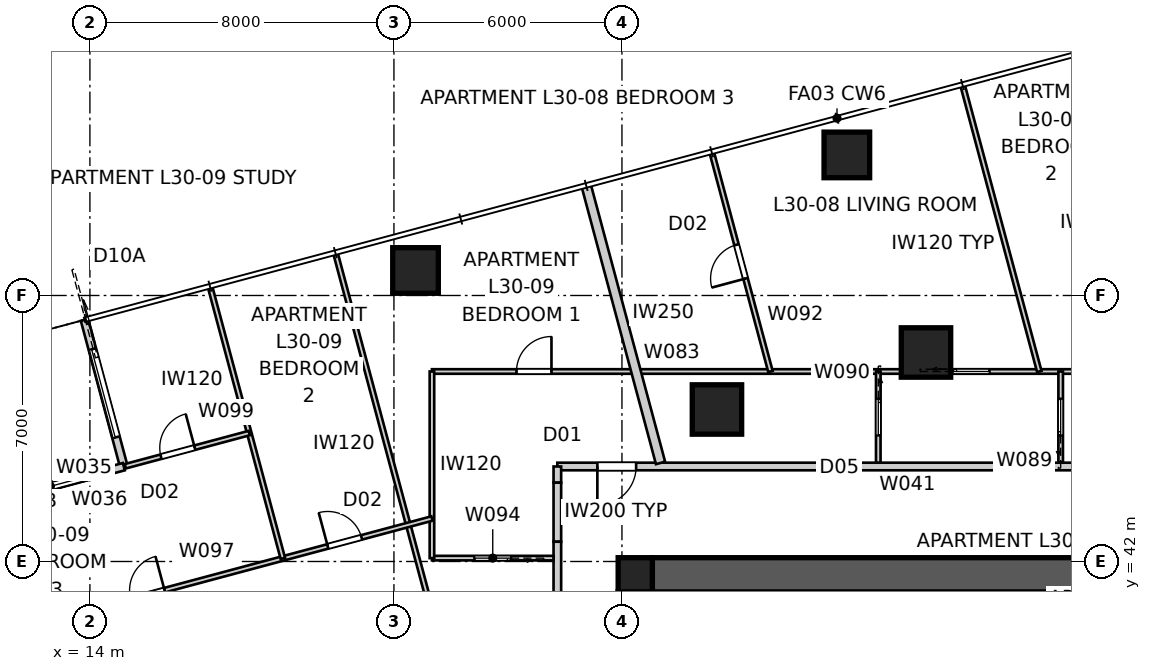
"""IFC4 building model, lengths in metres.
Left out: names, types, materials, properties, quantities, classifications, styles, units other than length and angle.
Written with IfcOpenShell. Run it as: python <this file> out.ifc"""

import sys

from ifc_helpers import new_model, si_unit, direction, frame, frame_2d, origin, origin_2d, place, context, subcontext, project, spatial, polyline, rectangle, outline, extrude, element, fill, save


model = new_model("IFC4")
c1 = context("Model", 3, precision=1e-05, world=origin(), true_north=direction((0.0, 1.0)))
c2 = subcontext(c1, "Body", "Model", "MODEL_VIEW")
j1 = project(units=[si_unit("LENGTHUNIT", "METRE"), si_unit("PLANEANGLEUNIT", "RADIAN")], contexts=[c1])
p1 = place(None, origin())
s1 = spatial("IfcSite", under=j1, at=p1, CompositionType="ELEMENT")
p2 = place(p1, origin())
s2 = spatial("IfcBuilding", under=s1, at=p2, CompositionType="ELEMENT")
p3 = place(p2, frame((0.0, 0.0, 111.6)))
s3 = spatial("IfcBuildingStorey", under=s2, at=p3, CompositionType="ELEMENT", Elevation=111.6)
p4 = place(p3, frame((28.8, 41.65, 0.0), z_axis=(0.0, 0.0, 1.0), x_axis=(1.0, 0.0, 0.0)))
e1 = element("IfcWall", 1, at=p4, inside=s3, PredefinedType="SHEAR", context=c2, shape_type="SweptSolid", body=[
    extrude(outline(polyline([(0.0, -0.45), (22.4, -0.45), (22.4, -0.025), (22.85, -0.025), (22.85, 0.025), (22.4, 0.025), (22.4, 0.45), (0.0, 0.45), (0.0, 0.025), (-0.45, 0.025), (-0.45, -0.025), (0.0, -0.025), (0.0, -0.45)])), origin(), (0.0, 0.0, 1.0), 3.4),
])
p5 = place(p3, frame((28.35, 41.2, 0.0), z_axis=(0.0, 0.0, 1.0), x_axis=(0.0, -1.0, 0.0)))
e2 = element("IfcWall", 2, at=p5, inside=s3, PredefinedType="SHEAR", context=c2, shape_type="SweptSolid", body=[
    extrude(outline(polyline([(0.0, -0.45), (22.4, -0.45), (22.4, -0.025), (22.85, -0.025), (22.85, 0.025), (22.4, 0.025), (22.4, 0.45), (0.0, 0.45), (0.0, 0.025), (-0.45, 0.025), (-0.45, -0.025), (0.0, -0.025), (0.0, -0.45)])), origin(), (0.0, 0.0, 1.0), 3.4),
])
p6 = place(p5, frame((11.14, 0.0, 0.0)))
e3 = element("IfcOpeningElement", 3, at=p6, cuts=e2, PredefinedType="OPENING", context=c2, shape_type="SweptSolid", body=[
    extrude(rectangle(XDim=1.02, YDim=2.4, at=frame_2d((0.51, 1.2))), frame((0.0, 0.46, 0.0), z_axis=(0.0, -1.0, 0.0), x_axis=(1.0, 0.0, 0.0)), (0.0, 0.0, 1.0), 0.92),
])
p7 = place(p3, frame((28.35, 41.65, 0.0), z_axis=(0.0, 0.0, 1.0), x_axis=(1.0, 0.0, 0.0)))
e4 = element("IfcColumn", 4, at=p7, inside=s3, PredefinedType="COLUMN", context=c2, shape_type="SweptSolid", body=[
    extrude(rectangle(XDim=0.9, YDim=0.9, at=origin_2d()), origin(), (0.0, 0.0, 1.0), 3.4),
])
for number, where, z_axis, x_axis in (
    (5, (33.918, 52.699, -0.15), (0.0, 0.0, 1.0), (1.0, 0.0, 0.0)),
    (6, (22.568, 49.658, -0.15), (0.0, 0.0, 1.0), (1.0, 0.0, 0.0)),
):
    element("IfcColumn", number, at=place(p3, frame(where, z_axis=z_axis, x_axis=x_axis)), inside=s3, PredefinedType="COLUMN", context=c2, shape_type="SweptSolid", body=[
        extrude(rectangle(XDim=1.2, YDim=1.2, at=origin_2d()), origin(), (0.0, 0.0, 1.0), 3.55),
    ])
for number, where, z_axis, x_axis in (
    (7, (36.0, 47.5, 0.0), (0.0, 0.0, 1.0), (1.0, 0.0, 0.0)),
    (8, (30.5, 46.0, 0.0), (0.0, 0.0, 1.0), (1.0, 0.0, 0.0)),
):
    element("IfcColumn", number, at=place(p3, frame(where, z_axis=z_axis, x_axis=x_axis)), inside=s3, PredefinedType="COLUMN", context=c2, shape_type="SweptSolid", body=[
        extrude(rectangle(XDim=1.3, YDim=1.3, at=origin_2d()), origin(), (0.0, 0.0, 1.0), 3.4),
    ])
p8 = place(p3, frame((13.857, 48.359, 0.0), z_axis=(0.0, 0.0, 1.0), x_axis=(0.258843877716, -0.965919172068, 0.0)))
e9 = element("IfcWall", 9, at=p8, inside=s3, PredefinedType="SOLIDWALL", context=c2, shape_type="SweptSolid", body=[
    extrude(rectangle(XDim=4.0, YDim=0.2, at=frame_2d((2.0, 0.0))), origin(), (0.0, 0.0, 1.0), 3.25),
])
p9 = place(p8, frame((0.8, 0.0, 0.0)))
e10 = element("IfcOpeningElement", 10, at=p9, cuts=e9, PredefinedType="OPENING", context=c2, shape_type="SweptSolid", body=[
    extrude(rectangle(XDim=2.4, YDim=2.1, at=frame_2d((1.2, 1.05))), frame((0.0, 0.11, 0.0), z_axis=(0.0, -1.0, 0.0), x_axis=(1.0, 0.0, 0.0)), (0.0, 0.0, 1.0), 0.22),
])
p10 = place(p3, frame((14.893, 44.496, 0.0), z_axis=(0.0, 0.0, 1.0), x_axis=(-0.965934430412, -0.258786931944, 0.0)))
e11 = element("IfcWall", 11, at=p10, inside=s3, PredefinedType="SOLIDWALL", context=c2, shape_type="SweptSolid", body=[
    extrude(rectangle(XDim=4.0, YDim=0.2, at=frame_2d((2.0, 0.0))), origin(), (0.0, 0.0, 1.0), 3.25),
])
p11 = place(p10, frame((1.0, 0.0, 0.45)))
e12 = element("IfcOpeningElement", 12, at=p11, cuts=e11, PredefinedType="OPENING", context=c2, shape_type="SweptSolid", body=[
    extrude(rectangle(XDim=2.0, YDim=1.8, at=frame_2d((1.0, 0.9))), frame((0.0, 0.11, 0.0), z_axis=(0.0, -1.0, 0.0), x_axis=(1.0, 0.0, 0.0)), (0.0, 0.0, 1.0), 0.22),
])
p12 = place(p3, frame((54.5, 44.5, 0.0), z_axis=(0.0, 0.0, 1.0), x_axis=(-1.0, 0.0, 0.0)))
e13 = element("IfcWall", 13, at=p12, inside=s3, PredefinedType="PARTITIONING", context=c2, shape_type="SweptSolid", body=[
    extrude(rectangle(XDim=28.2, YDim=0.2, at=frame_2d((14.1, 0.0))), origin(), (0.0, 0.0, 1.0), 3.25),
])
p13 = place(p12, frame((10.837, 0.0, 0.0)))
e14 = element("IfcOpeningElement", 14, at=p13, cuts=e13, PredefinedType="OPENING", context=c2, shape_type="SweptSolid", body=[
    extrude(rectangle(XDim=1.02, YDim=2.34, at=frame_2d((0.51, 1.17))), frame((0.0, 0.11, 0.0), z_axis=(0.0, -1.0, 0.0), x_axis=(1.0, 0.0, 0.0)), (0.0, 0.0, 1.0), 0.22),
])
p14 = place(p12, frame((5.7, 0.0, 0.0)))
e15 = element("IfcOpeningElement", 15, at=p14, cuts=e13, PredefinedType="OPENING", context=c2, shape_type="SweptSolid", body=[
    extrude(rectangle(XDim=1.02, YDim=2.34, at=frame_2d((0.51, 1.17))), frame((0.0, 0.11, 0.0), z_axis=(0.0, -1.0, 0.0), x_axis=(1.0, 0.0, 0.0)), (0.0, 0.0, 1.0), 0.22),
])
p15 = place(p12, frame((26.127, 0.0, 0.0)))
e16 = element("IfcOpeningElement", 16, at=p15, cuts=e13, PredefinedType="OPENING", context=c2, shape_type="SweptSolid", body=[
    extrude(rectangle(XDim=1.02, YDim=2.34, at=frame_2d((0.51, 1.17))), frame((0.0, 0.11, 0.0), z_axis=(0.0, -1.0, 0.0), x_axis=(1.0, 0.0, 0.0)), (0.0, 0.0, 1.0), 0.22),
])
p16 = place(p3, frame((26.3, 44.5, 0.0), z_axis=(0.0, 0.0, 1.0), x_axis=(0.0, -1.0, 0.0)))
e17 = element("IfcWall", 17, at=p16, inside=s3, PredefinedType="PARTITIONING", context=c2, shape_type="SweptSolid", body=[
    extrude(rectangle(XDim=0.426, YDim=0.2, at=frame_2d((0.213, 0.0))), origin(), (0.0, 0.0, 1.0), 3.25),
])
p17 = place(p3, frame((26.3, 44.074, 0.0), z_axis=(0.0, 0.0, 1.0), x_axis=(0.0, -1.0, 0.0)))
e18 = element("IfcWall", 18, at=p17, inside=s3, PredefinedType="PARTITIONING", context=c2, shape_type="SweptSolid", body=[
    extrude(rectangle(XDim=1.554, YDim=0.2, at=frame_2d((0.777, 0.0))), origin(), (0.0, 0.0, 1.0), 2.722),
])
p18 = place(p3, frame((26.3, 42.52, 0.0), z_axis=(0.0, 0.0, 1.0), x_axis=(0.0, -1.0, 0.0)))
e19 = element("IfcWall", 19, at=p18, inside=s3, PredefinedType="PARTITIONING", context=c2, shape_type="SweptSolid", body=[
    extrude(rectangle(XDim=27.02, YDim=0.2, at=frame_2d((13.51, 0.0))), origin(), (0.0, 0.0, 1.0), 3.25),
])
p19 = place(p18, frame((23.584, 0.0, 0.0)))
e20 = element("IfcOpeningElement", 20, at=p19, cuts=e19, PredefinedType="OPENING", context=c2, shape_type="SweptSolid", body=[
    extrude(rectangle(XDim=1.02, YDim=2.1, at=frame_2d((0.51, 1.05))), frame((0.0, 0.11, 0.0), z_axis=(0.0, -1.0, 0.0), x_axis=(1.0, 0.0, 0.0)), (0.0, 0.0, 1.0), 0.22),
])
p20 = place(p18, frame((13.468, 0.0, 0.0)))
e21 = element("IfcOpeningElement", 21, at=p20, cuts=e19, PredefinedType="OPENING", context=c2, shape_type="SweptSolid", body=[
    extrude(rectangle(XDim=1.02, YDim=2.34, at=frame_2d((0.51, 1.17))), frame((0.0, 0.11, 0.0), z_axis=(0.0, -1.0, 0.0), x_axis=(1.0, 0.0, 0.0)), (0.0, 0.0, 1.0), 0.22),
])
p21 = place(p3, frame((27.058, 51.896, 0.0), z_axis=(0.0, 0.0, 1.0), x_axis=(0.258822171171, -0.965924988656, 0.0)))
e22 = element("IfcWall", 22, at=p21, inside=s3, PredefinedType="PARTITIONING", context=c2, shape_type="SweptSolid", body=[
    extrude(rectangle(XDim=7.56, YDim=0.25, at=frame_2d((3.78, 0.0))), origin(), (0.0, 0.0, 1.0), 3.25),
])
p22 = place(p3, frame((23.0, 47.0, 0.0), z_axis=(0.0, 0.0, 1.0), x_axis=(1.0, 0.0, 0.0)))
e23 = element("IfcWall", 23, at=p22, inside=s3, PredefinedType="PARTITIONING", context=c2, shape_type="SweptSolid", body=[
    extrude(rectangle(XDim=25.241, YDim=0.12, at=frame_2d((12.62, 0.0))), origin(), (0.0, 0.0, 1.0), 2.55),
])
p23 = place(p22, frame((21.702, 0.0, 0.0)))
e24 = element("IfcOpeningElement", 24, at=p23, cuts=e23, PredefinedType="OPENING", context=c2, shape_type="SweptSolid", body=[
    extrude(rectangle(XDim=0.92, YDim=2.34, at=frame_2d((0.46, 1.17))), frame((0.0, 0.07, 0.0), z_axis=(0.0, -1.0, 0.0), x_axis=(1.0, 0.0, 0.0)), (0.0, 0.0, 1.0), 0.14),
])
p24 = place(p22, frame((17.598, 0.0, 0.0)))
e25 = element("IfcOpeningElement", 25, at=p24, cuts=e23, PredefinedType="OPENING", context=c2, shape_type="SweptSolid", body=[
    extrude(rectangle(XDim=0.92, YDim=2.34, at=frame_2d((0.46, 1.17))), frame((0.0, 0.07, 0.0), z_axis=(0.0, -1.0, 0.0), x_axis=(1.0, 0.0, 0.0)), (0.0, 0.0, 1.0), 0.14),
])
p25 = place(p22, frame((23.689, 0.0, 0.0)))
e26 = element("IfcOpeningElement", 26, at=p25, cuts=e23, PredefinedType="OPENING", context=c2, shape_type="SweptSolid", body=[
    extrude(rectangle(XDim=0.92, YDim=2.34, at=frame_2d((0.46, 1.17))), frame((0.0, 0.07, 0.0), z_axis=(0.0, -1.0, 0.0), x_axis=(1.0, 0.0, 0.0)), (0.0, 0.0, 1.0), 0.14),
])
p26 = place(p22, frame((2.225, 0.0, 0.0)))
e27 = element("IfcOpeningElement", 27, at=p26, cuts=e23, PredefinedType="OPENING", context=c2, shape_type="SweptSolid", body=[
    extrude(rectangle(XDim=0.92, YDim=2.34, at=frame_2d((0.46, 1.17))), frame((0.0, 0.07, 0.0), z_axis=(0.0, -1.0, 0.0), x_axis=(1.0, 0.0, 0.0)), (0.0, 0.0, 1.0), 0.14),
])
p27 = place(p22, frame((13.709, 0.0, 0.0)))
e28 = element("IfcOpeningElement", 28, at=p27, cuts=e23, PredefinedType="OPENING", context=c2, shape_type="SweptSolid", body=[
    extrude(rectangle(XDim=0.96, YDim=2.1, at=frame_2d((0.48, 1.05))), frame((0.0, 0.07, 0.0), z_axis=(0.0, -1.0, 0.0), x_axis=(1.0, 0.0, 0.0)), (0.0, 0.0, 1.0), 0.14),
])
p28 = place(p3, frame((39.544, 44.6, 0.0), z_axis=(0.0, 0.0, 1.0), x_axis=(0.0, 1.0, 0.0)))
e29 = element("IfcWall", 29, at=p28, inside=s3, PredefinedType="PARTITIONING", context=c2, shape_type="SweptSolid", body=[
    extrude(rectangle(XDim=2.4, YDim=0.12, at=frame_2d((1.2, 0.0))), origin(), (0.0, 0.0, 1.0), 3.25),
])
p29 = place(p28, frame((0.72, 0.0, 0.0)))
e30 = element("IfcOpeningElement", 30, at=p29, cuts=e29, PredefinedType="OPENING", context=c2, shape_type="SweptSolid", body=[
    extrude(rectangle(XDim=0.96, YDim=2.1, at=frame_2d((0.48, 1.05))), frame((0.0, 0.07, 0.0), z_axis=(0.0, -1.0, 0.0), x_axis=(1.0, 0.0, 0.0)), (0.0, 0.0, 1.0), 0.14),
])
p30 = place(p3, frame((34.745, 47.0, 0.0), z_axis=(0.0, 0.0, 1.0), x_axis=(0.0, -1.0, 0.0)))
e31 = element("IfcWall", 31, at=p30, inside=s3, PredefinedType="PARTITIONING", context=c2, shape_type="SweptSolid", body=[
    extrude(rectangle(XDim=2.4, YDim=0.12, at=frame_2d((1.2, 0.0))), origin(), (0.0, 0.0, 1.0), 3.25),
])
p31 = place(p30, frame((0.72, 0.0, 0.0)))
e32 = element("IfcOpeningElement", 32, at=p31, cuts=e31, PredefinedType="OPENING", context=c2, shape_type="SweptSolid", body=[
    extrude(rectangle(XDim=0.96, YDim=2.1, at=frame_2d((0.48, 1.05))), frame((0.0, 0.07, 0.0), z_axis=(0.0, -1.0, 0.0), x_axis=(1.0, 0.0, 0.0)), (0.0, 0.0, 1.0), 0.14),
])
p32 = place(p3, frame((36.969, 54.511, 0.0), z_axis=(0.0, 0.0, 1.0), x_axis=(0.258813509689, -0.965927309482, 0.0)))
e33 = element("IfcWall", 33, at=p32, inside=s3, PredefinedType="PARTITIONING", context=c2, shape_type="SweptSolid", body=[
    extrude(rectangle(XDim=7.776, YDim=0.12, at=frame_2d((3.888, 0.0))), origin(), (0.0, 0.0, 1.0), 3.25),
])
p33 = place(p3, frame((31.908, 47.0, 0.0), z_axis=(0.0, 0.0, 1.0), x_axis=(-0.258812722515, 0.965927520399, 0.0)))
e34 = element("IfcWall", 34, at=p33, inside=s3, PredefinedType="PARTITIONING", context=c2, shape_type="SweptSolid", body=[
    extrude(rectangle(XDim=5.945, YDim=0.12, at=frame_2d((2.972, 0.0))), origin(), (0.0, 0.0, 1.0), 3.25),
])
p34 = place(p33, frame((2.532, 0.0, 0.0)))
e35 = element("IfcOpeningElement", 35, at=p34, cuts=e34, PredefinedType="OPENING", context=c2, shape_type="SweptSolid", body=[
    extrude(rectangle(XDim=0.92, YDim=2.34, at=frame_2d((0.46, 1.17))), frame((0.0, 0.07, 0.0), z_axis=(0.0, -1.0, 0.0), x_axis=(1.0, 0.0, 0.0)), (0.0, 0.0, 1.0), 0.14),
])
p35 = place(p3, frame((26.2, 42.089, 0.0), z_axis=(0.0, 0.0, 1.0), x_axis=(-1.0, 0.0, 0.0)))
e36 = element("IfcWall", 36, at=p35, inside=s3, PredefinedType="PARTITIONING", context=c2, shape_type="SweptSolid", body=[
    extrude(rectangle(XDim=3.2, YDim=0.12, at=frame_2d((1.6, 0.0))), origin(), (0.0, 0.0, 1.0), 3.25),
])
p36 = place(p35, frame((1.12, 0.0, 0.0)))
e37 = element("IfcOpeningElement", 37, at=p36, cuts=e36, PredefinedType="OPENING", context=c2, shape_type="SweptSolid", body=[
    extrude(rectangle(XDim=0.96, YDim=2.1, at=frame_2d((0.48, 1.05))), frame((0.0, 0.07, 0.0), z_axis=(0.0, -1.0, 0.0), x_axis=(1.0, 0.0, 0.0)), (0.0, 0.0, 1.0), 0.14),
])
p37 = place(p3, frame((23.0, 42.089, 0.0), z_axis=(0.0, 0.0, 1.0), x_axis=(0.0, 1.0, 0.0)))
e38 = element("IfcWall", 38, at=p37, inside=s3, PredefinedType="PARTITIONING", context=c2, shape_type="SweptSolid", body=[
    extrude(rectangle(XDim=4.911, YDim=0.12, at=frame_2d((2.456, 0.0))), origin(), (0.0, 0.0, 1.0), 3.25),
])
p38 = place(p3, frame((23.0, 40.64, 0.0), z_axis=(0.0, 0.0, 1.0), x_axis=(-0.258790139317, 0.965933571108, 0.0)))
e39 = element("IfcWall", 39, at=p38, inside=s3, PredefinedType="PARTITIONING", context=c2, shape_type="SweptSolid", body=[
    extrude(rectangle(XDim=9.783, YDim=0.12, at=frame_2d((4.892, 0.0))), origin(), (0.0, 0.0, 1.0), 2.638),
])
p39 = place(p3, frame((11.952, 40.17, 0.0), z_axis=(0.0, 0.0, 1.0), x_axis=(0.965923183761, 0.258828906952, 0.0)))
e40 = element("IfcWall", 40, at=p39, inside=s3, PredefinedType="PARTITIONING", context=c2, shape_type="SweptSolid", body=[
    extrude(rectangle(XDim=11.438, YDim=0.12, at=frame_2d((5.719, 0.0))), origin(), (0.0, 0.0, 1.0), 3.25),
])
p40 = place(p39, frame((3.233, 0.0, 0.0)))
e41 = element("IfcOpeningElement", 41, at=p40, cuts=e40, PredefinedType="OPENING", context=c2, shape_type="SweptSolid", body=[
    extrude(rectangle(XDim=0.92, YDim=2.34, at=frame_2d((0.46, 1.17))), frame((0.0, 0.07, 0.0), z_axis=(0.0, -1.0, 0.0), x_axis=(1.0, 0.0, 0.0)), (0.0, 0.0, 1.0), 0.14),
])
p41 = place(p39, frame((8.6, 0.0, 0.0)))
e42 = element("IfcOpeningElement", 42, at=p41, cuts=e40, PredefinedType="OPENING", context=c2, shape_type="SweptSolid", body=[
    extrude(rectangle(XDim=0.92, YDim=2.34, at=frame_2d((0.46, 1.17))), frame((0.0, 0.07, 0.0), z_axis=(0.0, -1.0, 0.0), x_axis=(1.0, 0.0, 0.0)), (0.0, 0.0, 1.0), 0.14),
])
p42 = place(p3, frame((19.077, 42.08, 0.0), z_axis=(0.0, 0.0, 1.0), x_axis=(-0.258846923464, 0.965918355874, 0.0)))
e43 = element("IfcWall", 43, at=p42, inside=s3, PredefinedType="PARTITIONING", context=c2, shape_type="SweptSolid", body=[
    extrude(rectangle(XDim=7.377, YDim=0.12, at=frame_2d((3.688, 0.0))), origin(), (0.0, 0.0, 1.0), 3.25),
])
p43 = place(p3, frame((14.931, 44.506, 0.0), z_axis=(0.0, 0.0, 1.0), x_axis=(0.96593546512, 0.258783069815, 0.0)))
e44 = element("IfcWall", 44, at=p43, inside=s3, PredefinedType="PARTITIONING", context=c2, shape_type="SweptSolid", body=[
    extrude(rectangle(XDim=3.376, YDim=0.12, at=frame_2d((1.688, 0.0))), origin(), (0.0, 0.0, 1.0), 3.25),
])
p44 = place(p43, frame((0.971, 0.0, 0.0)))
e45 = element("IfcOpeningElement", 45, at=p44, cuts=e44, PredefinedType="OPENING", context=c2, shape_type="SweptSolid", body=[
    extrude(rectangle(XDim=0.92, YDim=2.34, at=frame_2d((0.46, 1.17))), frame((0.0, 0.07, 0.0), z_axis=(0.0, -1.0, 0.0), x_axis=(1.0, 0.0, 0.0)), (0.0, 0.0, 1.0), 0.14),
])
p45 = place(p9, origin())
e46 = element("IfcDoor", 46, at=p45, inside=s3, OperationType="SLIDING_TO_LEFT", PredefinedType="DOOR", context=c2, shape_type="SweptSolid", body=[
    extrude(rectangle(XDim=2.4, YDim=2.1, at=frame_2d((1.2, 1.05))), frame((0.0, 0.025, 0.0), z_axis=(0.0, -1.0, 0.0), x_axis=(1.0, 0.0, 0.0)), (0.0, 0.0, 1.0), 0.05),
])
fill(e10, e46)
p46 = place(p11, origin())
e47 = element("IfcWindow", 47, at=p46, inside=s3, PartitioningType="SINGLE_PANEL", PredefinedType="WINDOW", context=c2, shape_type="SweptSolid", body=[
    extrude(rectangle(XDim=2.0, YDim=1.8, at=frame_2d((1.0, 0.9))), frame((0.0, 0.03, 0.0), z_axis=(0.0, -1.0, 0.0), x_axis=(1.0, 0.0, 0.0)), (0.0, 0.0, 1.0), 0.06),
])
fill(e12, e47)
p47 = place(p15, origin())
e48 = element("IfcDoor", 48, at=p47, inside=s3, OperationType="SINGLE_SWING_RIGHT", PredefinedType="DOOR", context=c2, shape_type="SweptSolid", body=[
    extrude(rectangle(XDim=1.02, YDim=2.34, at=frame_2d((0.51, 1.17))), frame((0.0, 0.025, 0.0), z_axis=(0.0, -1.0, 0.0), x_axis=(1.0, 0.0, 0.0)), (0.0, 0.0, 1.0), 0.05),
])
fill(e16, e48)
p48 = place(p29, origin())
e49 = element("IfcDoor", 49, at=p48, inside=s3, OperationType="SLIDING_TO_LEFT", PredefinedType="DOOR", context=c2, shape_type="SweptSolid", body=[
    extrude(rectangle(XDim=0.96, YDim=2.1, at=frame_2d((0.48, 1.05))), frame((0.0, 0.025, 0.0), z_axis=(0.0, -1.0, 0.0), x_axis=(1.0, 0.0, 0.0)), (0.0, 0.0, 1.0), 0.05),
])
fill(e30, e49)
p49 = place(p26, origin())
e50 = element("IfcDoor", 50, at=p49, inside=s3, OperationType="SINGLE_SWING_RIGHT", PredefinedType="DOOR", context=c2, shape_type="SweptSolid", body=[
    extrude(rectangle(XDim=0.92, YDim=2.34, at=frame_2d((0.46, 1.17))), frame((0.0, 0.025, 0.0), z_axis=(0.0, -1.0, 0.0), x_axis=(1.0, 0.0, 0.0)), (0.0, 0.0, 1.0), 0.05),
])
fill(e27, e50)
p50 = place(p36, origin())
e51 = element("IfcDoor", 51, at=p50, inside=s3, OperationType="SLIDING_TO_LEFT", PredefinedType="DOOR", context=c2, shape_type="SweptSolid", body=[
    extrude(rectangle(XDim=0.96, YDim=2.1, at=frame_2d((0.48, 1.05))), frame((0.0, 0.025, 0.0), z_axis=(0.0, -1.0, 0.0), x_axis=(1.0, 0.0, 0.0)), (0.0, 0.0, 1.0), 0.05),
])
fill(e37, e51)
p51 = place(p27, origin())
e52 = element("IfcDoor", 52, at=p51, inside=s3, OperationType="SLIDING_TO_LEFT", PredefinedType="DOOR", context=c2, shape_type="SweptSolid", body=[
    extrude(rectangle(XDim=0.96, YDim=2.1, at=frame_2d((0.48, 1.05))), frame((0.0, 0.025, 0.0), z_axis=(0.0, -1.0, 0.0), x_axis=(1.0, 0.0, 0.0)), (0.0, 0.0, 1.0), 0.05),
])
fill(e28, e52)
p52 = place(p31, origin())
e53 = element("IfcDoor", 53, at=p52, inside=s3, OperationType="SLIDING_TO_LEFT", PredefinedType="DOOR", context=c2, shape_type="SweptSolid", body=[
    extrude(rectangle(XDim=0.96, YDim=2.1, at=frame_2d((0.48, 1.05))), frame((0.0, 0.025, 0.0), z_axis=(0.0, -1.0, 0.0), x_axis=(1.0, 0.0, 0.0)), (0.0, 0.0, 1.0), 0.05),
])
fill(e32, e53)
p53 = place(p34, origin())
e54 = element("IfcDoor", 54, at=p53, inside=s3, OperationType="SINGLE_SWING_LEFT", PredefinedType="DOOR", context=c2, shape_type="SweptSolid", body=[
    extrude(rectangle(XDim=0.92, YDim=2.34, at=frame_2d((0.46, 1.17))), frame((0.0, 0.025, 0.0), z_axis=(0.0, -1.0, 0.0), x_axis=(1.0, 0.0, 0.0)), (0.0, 0.0, 1.0), 0.05),
])
fill(e35, e54)
p54 = place(p40, origin())
e55 = element("IfcDoor", 55, at=p54, inside=s3, OperationType="SINGLE_SWING_RIGHT", PredefinedType="DOOR", context=c2, shape_type="SweptSolid", body=[
    extrude(rectangle(XDim=0.92, YDim=2.34, at=frame_2d((0.46, 1.17))), frame((0.0, 0.025, 0.0), z_axis=(0.0, -1.0, 0.0), x_axis=(1.0, 0.0, 0.0)), (0.0, 0.0, 1.0), 0.05),
])
fill(e41, e55)
p55 = place(p41, origin())
e56 = element("IfcDoor", 56, at=p55, inside=s3, OperationType="SINGLE_SWING_LEFT", PredefinedType="DOOR", context=c2, shape_type="SweptSolid", body=[
    extrude(rectangle(XDim=0.92, YDim=2.34, at=frame_2d((0.46, 1.17))), frame((0.0, 0.025, 0.0), z_axis=(0.0, -1.0, 0.0), x_axis=(1.0, 0.0, 0.0)), (0.0, 0.0, 1.0), 0.05),
])
fill(e42, e56)
p56 = place(p44, origin())
e57 = element("IfcDoor", 57, at=p56, inside=s3, OperationType="SINGLE_SWING_RIGHT", PredefinedType="DOOR", context=c2, shape_type="SweptSolid", body=[
    extrude(rectangle(XDim=0.92, YDim=2.34, at=frame_2d((0.46, 1.17))), frame((0.0, 0.025, 0.0), z_axis=(0.0, -1.0, 0.0), x_axis=(1.0, 0.0, 0.0)), (0.0, 0.0, 1.0), 0.05),
])
fill(e45, e57)
save(model, sys.argv[1])
